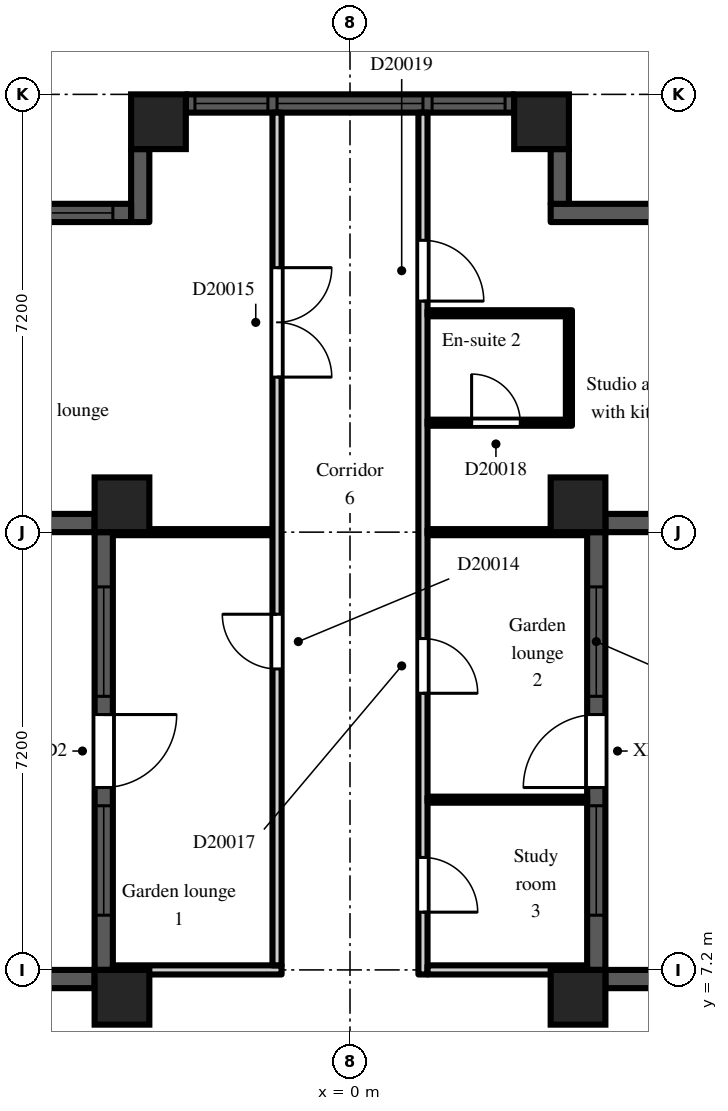
"""IFC4 building model, lengths in metres.
Left out: names, types, materials, properties, quantities, classifications, styles, units other than length and angle.
Written with IfcOpenShell. Run it as: python <this file> out.ifc"""

import sys

from ifc_helpers import new_model, si_unit, direction, frame, frame_2d, origin, origin_2d, place, context, subcontext, project, spatial, rectangle, extrude, element, fill, save


model = new_model("IFC4")
c1 = context("Model", 3, precision=1e-05, world=origin(), true_north=direction((0.0, 1.0)))
c2 = subcontext(c1, "Body", "Model", "MODEL_VIEW")
j1 = project(units=[si_unit("LENGTHUNIT", "METRE"), si_unit("PLANEANGLEUNIT", "RADIAN")], contexts=[c1])
p1 = place(None, origin())
s1 = spatial("IfcSite", under=j1, at=p1, CompositionType="ELEMENT")
p2 = place(p1, origin())
s2 = spatial("IfcBuilding", under=s1, at=p2, CompositionType="ELEMENT")
p3 = place(p2, frame((0.0, 0.0, 138.3)))
s3 = spatial("IfcBuildingStorey", under=s2, at=p3, CompositionType="ELEMENT", Elevation=138.3)
for number, where, z_axis, x_axis in (
    (1, (-3.75, 6.75, 0.0), (0.0, 0.0, 1.0), (1.0, 0.0, 0.0)),
    (2, (-3.75, 14.85, 0.0), (0.0, 0.0, 1.0), (1.0, 0.0, 0.0)),
    (3, (-3.15, 21.15, 0.0), (0.0, 0.0, 1.0), (1.0, 0.0, 0.0)),
    (4, (3.15, 21.15, 0.0), (0.0, 0.0, 1.0), (1.0, 0.0, 0.0)),
    (5, (3.75, 6.75, 0.0), (0.0, 0.0, 1.0), (1.0, 0.0, 0.0)),
    (6, (3.75, 14.85, 0.0), (0.0, 0.0, 1.0), (1.0, 0.0, 0.0)),
):
    element("IfcColumn", number, at=place(p3, frame(where, z_axis=z_axis, x_axis=x_axis)), inside=s3, PredefinedType="COLUMN", context=c2, shape_type="SweptSolid", body=[
        extrude(rectangle(XDim=0.9, YDim=0.9, at=origin_2d()), origin(), (0.0, 0.0, 1.0), 3.0),
    ])
p4 = place(p3, frame((7.2, 7.05, 0.0), z_axis=(0.0, 0.0, 1.0), x_axis=(-1.0, 0.0, 0.0)))
e7 = element("IfcWall", 7, at=p4, inside=s3, PredefinedType="SOLIDWALL", context=c2, shape_type="SweptSolid", body=[
    extrude(rectangle(XDim=3.0, YDim=0.3, at=frame_2d((1.5, 0.0))), origin(), (0.0, 0.0, 1.0), 2.2),
])
p5 = place(p3, frame((4.05, 7.2, 0.0), z_axis=(0.0, 0.0, 1.0), x_axis=(0.0, 1.0, 0.0)))
e8 = element("IfcWall", 8, at=p5, inside=s3, PredefinedType="SOLIDWALL", context=c2, shape_type="SweptSolid", body=[
    extrude(rectangle(XDim=7.2, YDim=0.3, at=frame_2d((3.6, 0.0))), origin(), (0.0, 0.0, 1.0), 2.2),
])
p6 = place(p5, frame((3.0, 0.0, 0.0)))
e9 = element("IfcOpeningElement", 9, at=p6, cuts=e8, PredefinedType="OPENING", context=c2, shape_type="SweptSolid", body=[
    extrude(rectangle(XDim=1.2, YDim=2.05, at=frame_2d((0.6, 1.025))), frame((0.0, 0.16, 0.0), z_axis=(0.0, -1.0, 0.0), x_axis=(1.0, 0.0, 0.0)), (0.0, 0.0, 1.0), 0.32),
])
p7 = place(p5, frame((0.9, 0.0, 0.2)))
e10 = element("IfcOpeningElement", 10, at=p7, cuts=e8, PredefinedType="OPENING", context=c2, shape_type="SweptSolid", body=[
    extrude(rectangle(XDim=1.8, YDim=1.85, at=frame_2d((0.9, 0.925))), frame((0.0, 0.16, 0.0), z_axis=(0.0, -1.0, 0.0), x_axis=(1.0, 0.0, 0.0)), (0.0, 0.0, 1.0), 0.32),
])
p8 = place(p5, frame((4.5, 0.0, 0.2)))
e11 = element("IfcOpeningElement", 11, at=p8, cuts=e8, PredefinedType="OPENING", context=c2, shape_type="SweptSolid", body=[
    extrude(rectangle(XDim=1.8, YDim=1.85, at=frame_2d((0.9, 0.925))), frame((0.0, 0.16, 0.0), z_axis=(0.0, -1.0, 0.0), x_axis=(1.0, 0.0, 0.0)), (0.0, 0.0, 1.0), 0.32),
])
p9 = place(p3, frame((4.2, 14.55, 0.0), z_axis=(0.0, 0.0, 1.0), x_axis=(1.0, 0.0, 0.0)))
e12 = element("IfcWall", 12, at=p9, inside=s3, PredefinedType="SOLIDWALL", context=c2, shape_type="SweptSolid", body=[
    extrude(rectangle(XDim=2.1, YDim=0.3, at=frame_2d((1.05, 0.0))), origin(), (0.0, 0.0, 1.0), 2.2),
])
p10 = place(p3, frame((5.1, 19.65, 0.0), z_axis=(0.0, 0.0, 1.0), x_axis=(-1.0, 0.0, 0.0)))
e13 = element("IfcWall", 13, at=p10, inside=s3, PredefinedType="SOLIDWALL", context=c2, shape_type="SweptSolid", body=[
    extrude(rectangle(XDim=1.8, YDim=0.3, at=frame_2d((0.9, 0.0))), origin(), (0.0, 0.0, 1.0), 2.6),
])
p11 = place(p3, frame((3.45, 19.8, 0.0), z_axis=(0.0, 0.0, 1.0), x_axis=(0.0, 1.0, 0.0)))
e14 = element("IfcWall", 14, at=p11, inside=s3, PredefinedType="SOLIDWALL", context=c2, shape_type="SweptSolid", body=[
    extrude(rectangle(XDim=0.9, YDim=0.3, at=frame_2d((0.45, 0.0))), origin(), (0.0, 0.0, 1.0), 2.6),
])
p12 = place(p3, frame((2.7, 21.45, 0.0), z_axis=(0.0, 0.0, 1.0), x_axis=(-1.0, 0.0, 0.0)))
e15 = element("IfcWall", 15, at=p12, inside=s3, PredefinedType="SOLIDWALL", context=c2, shape_type="SweptSolid", body=[
    extrude(rectangle(XDim=5.4, YDim=0.3, at=frame_2d((2.7, 0.0))), origin(), (0.0, 0.0, 1.0), 2.2),
])
p13 = place(p12, frame((1.5, 0.0, 0.2)))
e16 = element("IfcOpeningElement", 16, at=p13, cuts=e15, PredefinedType="OPENING", context=c2, shape_type="SweptSolid", body=[
    extrude(rectangle(XDim=2.4, YDim=1.85, at=frame_2d((1.2, 0.925))), frame((0.0, 0.16, 0.0), z_axis=(0.0, -1.0, 0.0), x_axis=(1.0, 0.0, 0.0)), (0.0, 0.0, 1.0), 0.32),
])
p14 = place(p12, frame((0.15, 0.0, 0.2)))
e17 = element("IfcOpeningElement", 17, at=p14, cuts=e15, PredefinedType="OPENING", context=c2, shape_type="SweptSolid", body=[
    extrude(rectangle(XDim=1.2, YDim=1.85, at=frame_2d((0.6, 0.925))), frame((0.0, 0.16, 0.0), z_axis=(0.0, -1.0, 0.0), x_axis=(1.0, 0.0, 0.0)), (0.0, 0.0, 1.0), 0.32),
])
p15 = place(p12, frame((4.05, 0.0, 0.2)))
e18 = element("IfcOpeningElement", 18, at=p15, cuts=e15, PredefinedType="OPENING", context=c2, shape_type="SweptSolid", body=[
    extrude(rectangle(XDim=1.2, YDim=1.85, at=frame_2d((0.6, 0.925))), frame((0.0, 0.16, 0.0), z_axis=(0.0, -1.0, 0.0), x_axis=(1.0, 0.0, 0.0)), (0.0, 0.0, 1.0), 0.32),
])
p16 = place(p3, frame((-3.45, 20.7, 0.0), z_axis=(0.0, 0.0, 1.0), x_axis=(0.0, -1.0, 0.0)))
e19 = element("IfcWall", 19, at=p16, inside=s3, PredefinedType="SOLIDWALL", context=c2, shape_type="SweptSolid", body=[
    extrude(rectangle(XDim=1.2, YDim=0.3, at=frame_2d((0.6, 0.0))), origin(), (0.0, 0.0, 1.0), 2.6),
])
p17 = place(p3, frame((-3.6, 19.65, 0.0), z_axis=(0.0, 0.0, 1.0), x_axis=(-1.0, 0.0, 0.0)))
e20 = element("IfcWall", 20, at=p17, inside=s3, PredefinedType="SOLIDWALL", context=c2, shape_type="SweptSolid", body=[
    extrude(rectangle(XDim=1.8, YDim=0.3, at=frame_2d((0.9, 0.0))), origin(), (0.0, 0.0, 1.0), 2.6),
])
p18 = place(p17, frame((0.3, 0.0, 0.2)))
e21 = element("IfcOpeningElement", 21, at=p18, cuts=e20, PredefinedType="OPENING", context=c2, shape_type="SweptSolid", body=[
    extrude(rectangle(XDim=1.2, YDim=1.85, at=frame_2d((0.6, 0.925))), frame((0.0, 0.16, 0.0), z_axis=(0.0, -1.0, 0.0), x_axis=(1.0, 0.0, 0.0)), (0.0, 0.0, 1.0), 0.32),
])
p19 = place(p3, frame((-6.3, 14.55, 0.0), z_axis=(0.0, 0.0, 1.0), x_axis=(1.0, 0.0, 0.0)))
e22 = element("IfcWall", 22, at=p19, inside=s3, PredefinedType="SOLIDWALL", context=c2, shape_type="SweptSolid", body=[
    extrude(rectangle(XDim=2.1, YDim=0.3, at=frame_2d((1.05, 0.0))), origin(), (0.0, 0.0, 1.0), 2.2),
])
p20 = place(p3, frame((-4.05, 14.4, 0.0), z_axis=(0.0, 0.0, 1.0), x_axis=(0.0, -1.0, 0.0)))
e23 = element("IfcWall", 23, at=p20, inside=s3, PredefinedType="SOLIDWALL", context=c2, shape_type="SweptSolid", body=[
    extrude(rectangle(XDim=7.2, YDim=0.3, at=frame_2d((3.6, 0.0))), origin(), (0.0, 0.0, 1.0), 2.2),
])
p21 = place(p20, frame((3.0, 0.0, 0.0)))
e24 = element("IfcOpeningElement", 24, at=p21, cuts=e23, PredefinedType="OPENING", context=c2, shape_type="SweptSolid", body=[
    extrude(rectangle(XDim=1.2, YDim=2.05, at=frame_2d((0.6, 1.025))), frame((0.0, 0.16, 0.0), z_axis=(0.0, -1.0, 0.0), x_axis=(1.0, 0.0, 0.0)), (0.0, 0.0, 1.0), 0.32),
])
p22 = place(p20, frame((0.9, 0.0, 0.2)))
e25 = element("IfcOpeningElement", 25, at=p22, cuts=e23, PredefinedType="OPENING", context=c2, shape_type="SweptSolid", body=[
    extrude(rectangle(XDim=1.8, YDim=1.85, at=frame_2d((0.9, 0.925))), frame((0.0, 0.16, 0.0), z_axis=(0.0, -1.0, 0.0), x_axis=(1.0, 0.0, 0.0)), (0.0, 0.0, 1.0), 0.32),
])
p23 = place(p20, frame((4.5, 0.0, 0.2)))
e26 = element("IfcOpeningElement", 26, at=p23, cuts=e23, PredefinedType="OPENING", context=c2, shape_type="SweptSolid", body=[
    extrude(rectangle(XDim=1.8, YDim=1.85, at=frame_2d((0.9, 0.925))), frame((0.0, 0.16, 0.0), z_axis=(0.0, -1.0, 0.0), x_axis=(1.0, 0.0, 0.0)), (0.0, 0.0, 1.0), 0.32),
])
p24 = place(p3, frame((-4.2, 7.05, 0.0), z_axis=(0.0, 0.0, 1.0), x_axis=(-1.0, 0.0, 0.0)))
e27 = element("IfcWall", 27, at=p24, inside=s3, PredefinedType="SOLIDWALL", context=c2, shape_type="SweptSolid", body=[
    extrude(rectangle(XDim=3.0, YDim=0.3, at=frame_2d((1.5, 0.0))), origin(), (0.0, 0.0, 1.0), 2.2),
])
p25 = place(p3, frame((-3.9, 7.2, 0.0), z_axis=(0.0, 0.0, 1.0), x_axis=(1.0, 0.0, 0.0)))
e28 = element("IfcWall", 28, at=p25, inside=s3, PredefinedType="PARTITIONING", context=c2, shape_type="SweptSolid", body=[
    extrude(rectangle(XDim=2.775, YDim=0.15, at=frame_2d((1.387, 0.0))), origin(), (0.0, 0.0, 1.0), 2.6),
])
p26 = place(p3, frame((-3.9, 14.4, 0.0), z_axis=(0.0, 0.0, 1.0), x_axis=(1.0, 0.0, 0.0)))
e29 = element("IfcWall", 29, at=p26, inside=s3, PredefinedType="PARTITIONING", context=c2, shape_type="SweptSolid", body=[
    extrude(rectangle(XDim=2.625, YDim=0.1, at=frame_2d((1.312, 0.0))), origin(), (0.0, 0.0, 1.0), 2.6),
])
p27 = place(p3, frame((-1.2, 7.275, 0.0), z_axis=(0.0, 0.0, 1.0), x_axis=(0.0, 1.0, 0.0)))
e30 = element("IfcWall", 30, at=p27, inside=s3, PredefinedType="PARTITIONING", context=c2, shape_type="SweptSolid", body=[
    extrude(rectangle(XDim=14.025, YDim=0.15, at=frame_2d((7.013, 0.0))), origin(), (0.0, 0.0, 1.0), 2.6),
])
p28 = place(p27, frame((4.875, 0.0, 0.0)))
e31 = element("IfcOpeningElement", 31, at=p28, cuts=e30, PredefinedType="OPENING", context=c2, shape_type="SweptSolid", body=[
    extrude(rectangle(XDim=0.9, YDim=2.1, at=frame_2d((0.45, 1.05))), frame((0.0, 0.085, 0.0), z_axis=(0.0, -1.0, 0.0), x_axis=(1.0, 0.0, 0.0)), (0.0, 0.0, 1.0), 0.17),
])
p29 = place(p27, frame((9.675, 0.0, 0.0)))
e32 = element("IfcOpeningElement", 32, at=p29, cuts=e30, PredefinedType="OPENING", context=c2, shape_type="SweptSolid", body=[
    extrude(rectangle(XDim=1.8, YDim=2.1, at=frame_2d((0.9, 1.05))), frame((0.0, 0.085, 0.0), z_axis=(0.0, -1.0, 0.0), x_axis=(1.0, 0.0, 0.0)), (0.0, 0.0, 1.0), 0.17),
])
p30 = place(p3, frame((1.2, 7.125, 0.0), z_axis=(0.0, 0.0, 1.0), x_axis=(0.0, 1.0, 0.0)))
e33 = element("IfcWall", 33, at=p30, inside=s3, PredefinedType="PARTITIONING", context=c2, shape_type="SweptSolid", body=[
    extrude(rectangle(XDim=14.175, YDim=0.15, at=frame_2d((7.087, 0.0))), origin(), (0.0, 0.0, 1.0), 2.6),
])
p31 = place(p30, frame((1.025, 0.0, 0.0)))
e34 = element("IfcOpeningElement", 34, at=p31, cuts=e33, PredefinedType="OPENING", context=c2, shape_type="SweptSolid", body=[
    extrude(rectangle(XDim=0.9, YDim=2.1, at=frame_2d((0.45, 1.05))), frame((0.0, 0.085, 0.0), z_axis=(0.0, -1.0, 0.0), x_axis=(1.0, 0.0, 0.0)), (0.0, 0.0, 1.0), 0.17),
])
p32 = place(p30, frame((4.625, 0.0, 0.0)))
e35 = element("IfcOpeningElement", 35, at=p32, cuts=e33, PredefinedType="OPENING", context=c2, shape_type="SweptSolid", body=[
    extrude(rectangle(XDim=0.9, YDim=2.1, at=frame_2d((0.45, 1.05))), frame((0.0, 0.085, 0.0), z_axis=(0.0, -1.0, 0.0), x_axis=(1.0, 0.0, 0.0)), (0.0, 0.0, 1.0), 0.17),
])
p33 = place(p30, frame((11.075, 0.0, 0.0)))
e36 = element("IfcOpeningElement", 36, at=p33, cuts=e33, PredefinedType="OPENING", context=c2, shape_type="SweptSolid", body=[
    extrude(rectangle(XDim=1.0, YDim=2.1, at=frame_2d((0.5, 1.05))), frame((0.0, 0.085, 0.0), z_axis=(0.0, -1.0, 0.0), x_axis=(1.0, 0.0, 0.0)), (0.0, 0.0, 1.0), 0.17),
])
p34 = place(p3, frame((1.275, 7.2, 0.0), z_axis=(0.0, 0.0, 1.0), x_axis=(1.0, 0.0, 0.0)))
e37 = element("IfcWall", 37, at=p34, inside=s3, PredefinedType="PARTITIONING", context=c2, shape_type="SweptSolid", body=[
    extrude(rectangle(XDim=2.625, YDim=0.15, at=frame_2d((1.312, 0.0))), origin(), (0.0, 0.0, 1.0), 2.6),
])
for number, where, z_axis, x_axis in (
    (38, (1.275, 10.0, 0.0), (0.0, 0.0, 1.0), (1.0, 0.0, 0.0)),
    (39, (1.275, 14.4, 0.0), (0.0, 0.0, 1.0), (1.0, 0.0, 0.0)),
):
    element("IfcWall", number, at=place(p3, frame(where, z_axis=z_axis, x_axis=x_axis)), inside=s3, PredefinedType="PARTITIONING", context=c2, shape_type="SweptSolid", body=[
        extrude(rectangle(XDim=2.625, YDim=0.1, at=frame_2d((1.312, 0.0))), origin(), (0.0, 0.0, 1.0), 2.6),
    ])
p35 = place(p3, frame((1.275, 16.2, 0.0), z_axis=(0.0, 0.0, 1.0), x_axis=(1.0, 0.0, 0.0)))
e40 = element("IfcWall", 40, at=p35, inside=s3, PredefinedType="PARTITIONING", context=c2, shape_type="SweptSolid", body=[
    extrude(rectangle(XDim=2.375, YDim=0.1, at=frame_2d((1.188, 0.0))), origin(), (0.0, 0.0, 1.0), 2.6),
])
p36 = place(p35, frame((0.725, 0.0, 0.0)))
e41 = element("IfcOpeningElement", 41, at=p36, cuts=e40, PredefinedType="OPENING", context=c2, shape_type="SweptSolid", body=[
    extrude(rectangle(XDim=0.8, YDim=2.1, at=frame_2d((0.4, 1.05))), frame((0.0, 0.06, 0.0), z_axis=(0.0, -1.0, 0.0), x_axis=(1.0, 0.0, 0.0)), (0.0, 0.0, 1.0), 0.12),
])
p37 = place(p3, frame((1.275, 18.0, 0.0), z_axis=(0.0, 0.0, 1.0), x_axis=(1.0, 0.0, 0.0)))
e42 = element("IfcWall", 42, at=p37, inside=s3, PredefinedType="PARTITIONING", context=c2, shape_type="SweptSolid", body=[
    extrude(rectangle(XDim=2.375, YDim=0.1, at=frame_2d((1.188, 0.0))), origin(), (0.0, 0.0, 1.0), 2.6),
])
p38 = place(p3, frame((3.6, 16.25, 0.0), z_axis=(0.0, 0.0, 1.0), x_axis=(0.0, 1.0, 0.0)))
e43 = element("IfcWall", 43, at=p38, inside=s3, PredefinedType="PARTITIONING", context=c2, shape_type="SweptSolid", body=[
    extrude(rectangle(XDim=1.7, YDim=0.1, at=frame_2d((0.85, 0.0))), origin(), (0.0, 0.0, 1.0), 2.6),
])
p39 = place(p6, origin())
e44 = element("IfcDoor", 44, at=p39, inside=s3, OperationType="SINGLE_SWING_LEFT", PredefinedType="DOOR", context=c2, shape_type="SweptSolid", body=[
    extrude(rectangle(XDim=1.2, YDim=2.05, at=frame_2d((0.6, 1.025))), frame((0.0, 0.025, 0.0), z_axis=(0.0, -1.0, 0.0), x_axis=(1.0, 0.0, 0.0)), (0.0, 0.0, 1.0), 0.05),
])
fill(e9, e44)
p40 = place(p7, origin())
e45 = element("IfcWindow", 45, at=p40, inside=s3, PartitioningType="SINGLE_PANEL", PredefinedType="WINDOW", context=c2, shape_type="SweptSolid", body=[
    extrude(rectangle(XDim=1.8, YDim=1.85, at=frame_2d((0.9, 0.925))), frame((0.0, 0.03, 0.0), z_axis=(0.0, -1.0, 0.0), x_axis=(1.0, 0.0, 0.0)), (0.0, 0.0, 1.0), 0.06),
])
fill(e10, e45)
p41 = place(p8, origin())
e46 = element("IfcWindow", 46, at=p41, inside=s3, PartitioningType="SINGLE_PANEL", PredefinedType="WINDOW", context=c2, shape_type="SweptSolid", body=[
    extrude(rectangle(XDim=1.8, YDim=1.85, at=frame_2d((0.9, 0.925))), frame((0.0, 0.03, 0.0), z_axis=(0.0, -1.0, 0.0), x_axis=(1.0, 0.0, 0.0)), (0.0, 0.0, 1.0), 0.06),
])
fill(e11, e46)
p42 = place(p13, origin())
e47 = element("IfcWindow", 47, at=p42, inside=s3, PartitioningType="SINGLE_PANEL", PredefinedType="WINDOW", context=c2, shape_type="SweptSolid", body=[
    extrude(rectangle(XDim=2.4, YDim=1.85, at=frame_2d((1.2, 0.925))), frame((0.0, 0.03, 0.0), z_axis=(0.0, -1.0, 0.0), x_axis=(1.0, 0.0, 0.0)), (0.0, 0.0, 1.0), 0.06),
])
fill(e16, e47)
p43 = place(p14, origin())
e48 = element("IfcWindow", 48, at=p43, inside=s3, PartitioningType="SINGLE_PANEL", PredefinedType="WINDOW", context=c2, shape_type="SweptSolid", body=[
    extrude(rectangle(XDim=1.2, YDim=1.85, at=frame_2d((0.6, 0.925))), frame((0.0, 0.03, 0.0), z_axis=(0.0, -1.0, 0.0), x_axis=(1.0, 0.0, 0.0)), (0.0, 0.0, 1.0), 0.06),
])
fill(e17, e48)
p44 = place(p15, origin())
e49 = element("IfcWindow", 49, at=p44, inside=s3, PartitioningType="SINGLE_PANEL", PredefinedType="WINDOW", context=c2, shape_type="SweptSolid", body=[
    extrude(rectangle(XDim=1.2, YDim=1.85, at=frame_2d((0.6, 0.925))), frame((0.0, 0.03, 0.0), z_axis=(0.0, -1.0, 0.0), x_axis=(1.0, 0.0, 0.0)), (0.0, 0.0, 1.0), 0.06),
])
fill(e18, e49)
p45 = place(p18, origin())
e50 = element("IfcWindow", 50, at=p45, inside=s3, PartitioningType="SINGLE_PANEL", PredefinedType="WINDOW", context=c2, shape_type="SweptSolid", body=[
    extrude(rectangle(XDim=1.2, YDim=1.85, at=frame_2d((0.6, 0.925))), frame((0.0, 0.03, 0.0), z_axis=(0.0, -1.0, 0.0), x_axis=(1.0, 0.0, 0.0)), (0.0, 0.0, 1.0), 0.06),
])
fill(e21, e50)
p46 = place(p21, origin())
e51 = element("IfcDoor", 51, at=p46, inside=s3, OperationType="SINGLE_SWING_LEFT", PredefinedType="DOOR", context=c2, shape_type="SweptSolid", body=[
    extrude(rectangle(XDim=1.2, YDim=2.05, at=frame_2d((0.6, 1.025))), frame((0.0, 0.025, 0.0), z_axis=(0.0, -1.0, 0.0), x_axis=(1.0, 0.0, 0.0)), (0.0, 0.0, 1.0), 0.05),
])
fill(e24, e51)
p47 = place(p22, origin())
e52 = element("IfcWindow", 52, at=p47, inside=s3, PartitioningType="SINGLE_PANEL", PredefinedType="WINDOW", context=c2, shape_type="SweptSolid", body=[
    extrude(rectangle(XDim=1.8, YDim=1.85, at=frame_2d((0.9, 0.925))), frame((0.0, 0.03, 0.0), z_axis=(0.0, -1.0, 0.0), x_axis=(1.0, 0.0, 0.0)), (0.0, 0.0, 1.0), 0.06),
])
fill(e25, e52)
p48 = place(p23, origin())
e53 = element("IfcWindow", 53, at=p48, inside=s3, PartitioningType="SINGLE_PANEL", PredefinedType="WINDOW", context=c2, shape_type="SweptSolid", body=[
    extrude(rectangle(XDim=1.8, YDim=1.85, at=frame_2d((0.9, 0.925))), frame((0.0, 0.03, 0.0), z_axis=(0.0, -1.0, 0.0), x_axis=(1.0, 0.0, 0.0)), (0.0, 0.0, 1.0), 0.06),
])
fill(e26, e53)
p49 = place(p28, origin())
e54 = element("IfcDoor", 54, at=p49, inside=s3, OperationType="SINGLE_SWING_RIGHT", PredefinedType="DOOR", context=c2, shape_type="SweptSolid", body=[
    extrude(rectangle(XDim=0.9, YDim=2.1, at=frame_2d((0.45, 1.05))), frame((0.0, 0.025, 0.0), z_axis=(0.0, -1.0, 0.0), x_axis=(1.0, 0.0, 0.0)), (0.0, 0.0, 1.0), 0.05),
])
fill(e31, e54)
p50 = place(p29, frame((1.8, 0.0, 0.0), z_axis=(0.0, 0.0, 1.0), x_axis=(-1.0, 0.0, 0.0)))
e55 = element("IfcDoor", 55, at=p50, inside=s3, OperationType="DOUBLE_DOOR_DOUBLE_SWING", PredefinedType="DOOR", context=c2, shape_type="SweptSolid", body=[
    extrude(rectangle(XDim=1.8, YDim=2.1, at=frame_2d((0.9, 1.05))), frame((0.0, 0.025, 0.0), z_axis=(0.0, -1.0, 0.0), x_axis=(1.0, 0.0, 0.0)), (0.0, 0.0, 1.0), 0.05),
])
fill(e32, e55)
p51 = place(p31, frame((0.9, 0.0, 0.0), z_axis=(0.0, 0.0, 1.0), x_axis=(-1.0, 0.0, 0.0)))
e56 = element("IfcDoor", 56, at=p51, inside=s3, OperationType="SINGLE_SWING_RIGHT", PredefinedType="DOOR", context=c2, shape_type="SweptSolid", body=[
    extrude(rectangle(XDim=0.9, YDim=2.1, at=frame_2d((0.45, 1.05))), frame((0.0, 0.025, 0.0), z_axis=(0.0, -1.0, 0.0), x_axis=(1.0, 0.0, 0.0)), (0.0, 0.0, 1.0), 0.05),
])
fill(e34, e56)
p52 = place(p32, frame((0.9, 0.0, 0.0), z_axis=(0.0, 0.0, 1.0), x_axis=(-1.0, 0.0, 0.0)))
e57 = element("IfcDoor", 57, at=p52, inside=s3, OperationType="SINGLE_SWING_RIGHT", PredefinedType="DOOR", context=c2, shape_type="SweptSolid", body=[
    extrude(rectangle(XDim=0.9, YDim=2.1, at=frame_2d((0.45, 1.05))), frame((0.0, 0.025, 0.0), z_axis=(0.0, -1.0, 0.0), x_axis=(1.0, 0.0, 0.0)), (0.0, 0.0, 1.0), 0.05),
])
fill(e35, e57)
p53 = place(p36, origin())
e58 = element("IfcDoor", 58, at=p53, inside=s3, OperationType="SINGLE_SWING_LEFT", PredefinedType="DOOR", context=c2, shape_type="SweptSolid", body=[
    extrude(rectangle(XDim=0.8, YDim=2.1, at=frame_2d((0.4, 1.05))), frame((0.0, 0.025, 0.0), z_axis=(0.0, -1.0, 0.0), x_axis=(1.0, 0.0, 0.0)), (0.0, 0.0, 1.0), 0.05),
])
fill(e41, e58)
p54 = place(p33, frame((1.0, 0.0, 0.0), z_axis=(0.0, 0.0, 1.0), x_axis=(-1.0, 0.0, 0.0)))
e59 = element("IfcDoor", 59, at=p54, inside=s3, OperationType="SINGLE_SWING_RIGHT", PredefinedType="DOOR", context=c2, shape_type="SweptSolid", body=[
    extrude(rectangle(XDim=1.0, YDim=2.1, at=frame_2d((0.5, 1.05))), frame((0.0, 0.025, 0.0), z_axis=(0.0, -1.0, 0.0), x_axis=(1.0, 0.0, 0.0)), (0.0, 0.0, 1.0), 0.05),
])
fill(e36, e59)
save(model, sys.argv[1])
